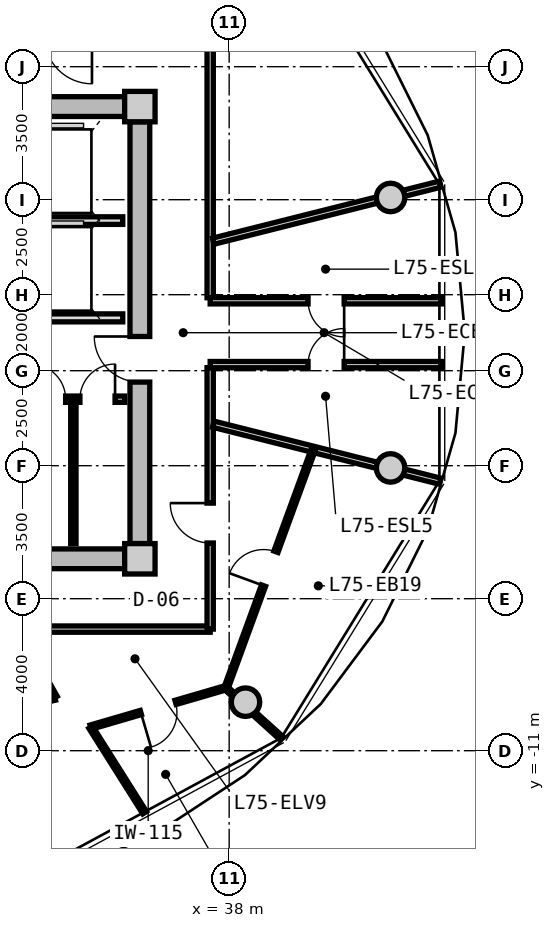
"""IFC4 building model, lengths in metres.
Left out: names, types, materials, properties, quantities, classifications, styles, units other than length and angle.
Written with IfcOpenShell. Run it as: python <this file> out.ifc"""

import sys

from ifc_helpers import new_model, si_unit, direction, frame, frame_2d, origin, origin_2d, place, context, subcontext, project, spatial, rectangle, circle, extrude, source, transform, mapped, element, fill, save


model = new_model("IFC4")
c1 = context("Model", 3, precision=1e-05, world=origin(), true_north=direction((0.0, 1.0)))
c2 = subcontext(c1, "Body", "Model", "MODEL_VIEW")
j1 = project(units=[si_unit("LENGTHUNIT", "METRE"), si_unit("PLANEANGLEUNIT", "RADIAN")], contexts=[c1])
p1 = place(None, origin())
s1 = spatial("IfcSite", under=j1, at=p1, CompositionType="ELEMENT")
p2 = place(p1, origin())
s2 = spatial("IfcBuilding", under=s1, at=p2, CompositionType="ELEMENT")
p3 = place(p2, frame((0.0, 0.0, 241.35)))
s3 = spatial("IfcBuildingStorey", under=s2, at=p3, CompositionType="ELEMENT", Elevation=241.35)
m1 = source(origin(), c2, "Body", "SweptSolid", [
    extrude(rectangle(XDim=0.8, YDim=0.8, at=origin_2d()), origin(), (0.0, 0.0, 1.0), 3.05),
])
for number, where, z_axis, x_axis in (
    (1, (35.65, -5.95, 0.0), (0.0, 0.0, 1.0), (1.0, 0.0, 0.0)),
    (2, (35.65, 5.95, 0.0), (0.0, 0.0, 1.0), (1.0, 0.0, 0.0)),
):
    element("IfcColumn", number, at=place(p3, frame(where, z_axis=z_axis, x_axis=x_axis)), inside=s3, PredefinedType="COLUMN", context=c2, shape_type="MappedRepresentation", body=[
        mapped(m1, transform((0.0, 0.0, 0.0), x_axis=(1.0, 0.0, 0.0), y_axis=(0.0, 1.0, 0.0), z_axis=(0.0, 0.0, 1.0), scale=1.0)),
    ])
m2 = source(origin(), c2, "Body", "SweptSolid", [
    extrude(rectangle(XDim=14.5, YDim=0.52, at=frame_2d((7.25, 0.0))), origin(), (0.0, 0.0, 1.0), 2.73),
])
for number, where, z_axis, x_axis in (
    (3, (20.75, 5.95, 0.0), (0.0, 0.0, 1.0), (1.0, 0.0, 0.0)),
    (4, (35.25, -5.95, 0.0), (0.0, 0.0, 1.0), (-1.0, 0.0, 0.0)),
):
    element("IfcWall", number, at=place(p3, frame(where, z_axis=z_axis, x_axis=x_axis)), inside=s3, PredefinedType="SHEAR", context=c2, shape_type="MappedRepresentation", body=[
        mapped(m2, transform((0.0, 0.0, 0.0), x_axis=(1.0, 0.0, 0.0), y_axis=(0.0, 1.0, 0.0), z_axis=(0.0, 0.0, 1.0), scale=1.0)),
    ])
m3 = source(origin(), c2, "Body", "SweptSolid", [
    extrude(rectangle(XDim=11.1, YDim=0.52, at=frame_2d((5.55, 0.0))), origin(), (0.0, 0.0, 1.0), 2.73),
])
p4 = place(p3, frame((35.65, 5.55, 0.0), z_axis=(0.0, 0.0, 1.0), x_axis=(0.0, -1.0, 0.0)))
e5 = element("IfcWall", 5, at=p4, inside=s3, PredefinedType="SHEAR", context=c2, shape_type="MappedRepresentation", body=[
    mapped(m3, transform((0.0, 0.0, 0.0), x_axis=(1.0, 0.0, 0.0), y_axis=(0.0, 1.0, 0.0), z_axis=(0.0, 0.0, 1.0), scale=1.0)),
])
p5 = place(p4, frame((5.65, 0.0, 0.0)))
e6 = element("IfcOpeningElement", 6, at=p5, cuts=e5, PredefinedType="OPENING", context=c2, shape_type="SweptSolid", body=[
    extrude(rectangle(XDim=1.2, YDim=2.15, at=frame_2d((0.6, 1.075))), frame((0.0, 0.27, 0.0), z_axis=(0.0, -1.0, 0.0), x_axis=(1.0, 0.0, 0.0)), (0.0, 0.0, 1.0), 0.54),
])
m4 = source(origin(), c2, "Body", "SweptSolid", [
    extrude(circle(Radius=0.375, at=origin_2d()), origin(), (0.0, 0.0, 1.0), 3.05),
])
for number, where, z_axis, x_axis in (
    (7, (42.247, 3.559, 0.0), (0.0, 0.0, 1.0), (1.0, 0.0, 0.0)),
    (8, (38.43, -9.723, 0.0), (0.0, 0.0, 1.0), (1.0, 0.0, 0.0)),
    (9, (42.247, -3.559, 0.0), (0.0, 0.0, 1.0), (1.0, 0.0, 0.0)),
):
    element("IfcColumn", number, at=place(p3, frame(where, z_axis=z_axis, x_axis=x_axis)), inside=s3, PredefinedType="COLUMN", context=c2, shape_type="MappedRepresentation", body=[
        mapped(m4, transform((0.0, 0.0, 0.0), x_axis=(1.0, 0.0, 0.0), y_axis=(0.0, 1.0, 0.0), z_axis=(0.0, 0.0, 1.0), scale=1.0)),
    ])
m5 = source(origin(), c2, "Body", "SweptSolid", [
    extrude(rectangle(XDim=3.2, YDim=0.2, at=frame_2d((1.6, 0.0))), origin(), (0.0, 0.0, 1.0), 2.715),
])
p6 = place(p3, frame((32.0, 2.95, 0.0), z_axis=(0.0, 0.0, 1.0), x_axis=(1.0, 0.0, 0.0)))
e10 = element("IfcWall", 10, at=p6, inside=s3, PredefinedType="PARTITIONING", context=c2, shape_type="MappedRepresentation", body=[
    mapped(m5, transform((0.0, 0.0, 0.0), x_axis=(1.0, 0.0, 0.0), y_axis=(0.0, 1.0, 0.0), z_axis=(0.0, 0.0, 1.0), scale=1.0)),
])
m6 = source(origin(), c2, "Body", "SweptSolid", [
    extrude(rectangle(XDim=6.66, YDim=0.21, at=frame_2d((3.33, 0.0))), origin(), (0.0, 0.0, 1.0), 2.715),
])
p7 = place(p3, frame((28.54, 0.39, 0.0), z_axis=(0.0, 0.0, 1.0), x_axis=(1.0, 0.0, 0.0)))
e11 = element("IfcWall", 11, at=p7, inside=s3, PredefinedType="PARTITIONING", context=c2, shape_type="MappedRepresentation", body=[
    mapped(m6, transform((0.0, 0.0, 0.0), x_axis=(1.0, 0.0, 0.0), y_axis=(0.0, 1.0, 0.0), z_axis=(0.0, 0.0, 1.0), scale=1.0)),
])
p8 = place(p7, frame((1.0, 0.0, 0.0)))
e12 = element("IfcOpeningElement", 12, at=p8, cuts=e11, PredefinedType="OPENING", context=c2, shape_type="SweptSolid", body=[
    extrude(rectangle(XDim=1.2, YDim=2.15, at=frame_2d((0.6, 1.075))), frame((0.0, 0.115, 0.0), z_axis=(0.0, -1.0, 0.0), x_axis=(1.0, 0.0, 0.0)), (0.0, 0.0, 1.0), 0.23),
])
m7 = source(origin(), c2, "Body", "SweptSolid", [
    extrude(rectangle(XDim=2.7, YDim=0.165, at=frame_2d((1.35, 0.0))), origin(), (0.0, 0.0, 1.0), 2.715),
])
p9 = place(p3, frame((32.55, -1.75, 0.0), z_axis=(0.0, 0.0, 1.0), x_axis=(1.0, 0.0, 0.0)))
e13 = element("IfcWall", 13, at=p9, inside=s3, PredefinedType="PARTITIONING", context=c2, shape_type="MappedRepresentation", body=[
    mapped(m7, transform((0.0, 0.0, 0.0), x_axis=(1.0, 0.0, 0.0), y_axis=(0.0, 1.0, 0.0), z_axis=(0.0, 0.0, 1.0), scale=1.0)),
])
p10 = place(p9, frame((0.222, 0.0, 0.0)))
e14 = element("IfcOpeningElement", 14, at=p10, cuts=e13, PredefinedType="OPENING", context=c2, shape_type="SweptSolid", body=[
    extrude(rectangle(XDim=0.925, YDim=2.1, at=frame_2d((0.462, 1.05))), frame((0.0, 0.093, 0.0), z_axis=(0.0, -1.0, 0.0), x_axis=(1.0, 0.0, 0.0)), (0.0, 0.0, 1.0), 0.185),
])
p11 = place(p9, frame((1.522, 0.0, 0.0)))
e15 = element("IfcOpeningElement", 15, at=p11, cuts=e13, PredefinedType="OPENING", context=c2, shape_type="SweptSolid", body=[
    extrude(rectangle(XDim=0.925, YDim=2.1, at=frame_2d((0.462, 1.05))), frame((0.0, 0.093, 0.0), z_axis=(0.0, -1.0, 0.0), x_axis=(1.0, 0.0, 0.0)), (0.0, 0.0, 1.0), 0.185),
])
m8 = source(origin(), c2, "Body", "SweptSolid", [
    extrude(rectangle(XDim=3.8, YDim=0.14, at=frame_2d((1.9, 0.0))), origin(), (0.0, 0.0, 1.0), 2.715),
])
p12 = place(p3, frame((33.9, -5.55, 0.0), z_axis=(0.0, 0.0, 1.0), x_axis=(0.0, 1.0, 0.0)))
e16 = element("IfcWall", 16, at=p12, inside=s3, PredefinedType="PARTITIONING", context=c2, shape_type="MappedRepresentation", body=[
    mapped(m8, transform((0.0, 0.0, 0.0), x_axis=(1.0, 0.0, 0.0), y_axis=(0.0, 1.0, 0.0), z_axis=(0.0, 0.0, 1.0), scale=1.0)),
])
m9 = source(origin(), c2, "Body", "SweptSolid", [
    extrude(rectangle(XDim=19.0, YDim=0.165, at=frame_2d((9.5, 0.0))), origin(), (0.0, 0.0, 1.0), 2.715),
])
p13 = place(p3, frame((37.5, -7.8, 0.0), z_axis=(0.0, 0.0, 1.0), x_axis=(-1.0, 0.0, 0.0)))
e17 = element("IfcWall", 17, at=p13, inside=s3, PredefinedType="PARTITIONING", context=c2, shape_type="MappedRepresentation", body=[
    mapped(m9, transform((0.0, 0.0, 0.0), x_axis=(1.0, 0.0, 0.0), y_axis=(0.0, 1.0, 0.0), z_axis=(0.0, 0.0, 1.0), scale=1.0)),
])
p14 = place(p13, frame((12.373, 0.0, 0.0)))
e18 = element("IfcOpeningElement", 18, at=p14, cuts=e17, PredefinedType="OPENING", context=c2, shape_type="SweptSolid", body=[
    extrude(rectangle(XDim=1.25, YDim=2.2, at=frame_2d((0.625, 1.1))), frame((0.0, 0.093, 0.0), z_axis=(0.0, -1.0, 0.0), x_axis=(1.0, 0.0, 0.0)), (0.0, 0.0, 1.0), 0.185),
])
m10 = source(origin(), c2, "Body", "SweptSolid", [
    extrude(rectangle(XDim=6.88, YDim=0.165, at=frame_2d((3.44, 0.0))), origin(), (0.0, 0.0, 1.0), 2.715),
])
p15 = place(p3, frame((37.5, 7.8, 0.0), z_axis=(0.0, 0.0, 1.0), x_axis=(0.0, -1.0, 0.0)))
e19 = element("IfcWall", 19, at=p15, inside=s3, PredefinedType="PARTITIONING", context=c2, shape_type="MappedRepresentation", body=[
    mapped(m10, transform((0.0, 0.0, 0.0), x_axis=(1.0, 0.0, 0.0), y_axis=(0.0, 1.0, 0.0), z_axis=(0.0, 0.0, 1.0), scale=1.0)),
])
p16 = place(p3, frame((37.5, -0.92, 0.0), z_axis=(0.0, 0.0, 1.0), x_axis=(0.0, -1.0, 0.0)))
e20 = element("IfcWall", 20, at=p16, inside=s3, PredefinedType="PARTITIONING", context=c2, shape_type="MappedRepresentation", body=[
    mapped(m10, transform((0.0, 0.0, 0.0), x_axis=(1.0, 0.0, 0.0), y_axis=(0.0, 1.0, 0.0), z_axis=(0.0, 0.0, 1.0), scale=1.0)),
])
p17 = place(p16, frame((3.564, 0.0, 0.0)))
e21 = element("IfcOpeningElement", 21, at=p17, cuts=e20, PredefinedType="OPENING", context=c2, shape_type="SweptSolid", body=[
    extrude(rectangle(XDim=1.05, YDim=2.15, at=frame_2d((0.525, 1.075))), frame((0.0, 0.093, 0.0), z_axis=(0.0, -1.0, 0.0), x_axis=(1.0, 0.0, 0.0)), (0.0, 0.0, 1.0), 0.185),
])
m11 = source(origin(), c2, "Body", "SweptSolid", [
    extrude(rectangle(XDim=6.157, YDim=0.165, at=frame_2d((3.079, 0.0))), origin(), (0.0, 0.0, 1.0), 2.315),
])
for number, where, z_axis, x_axis in (
    (22, (37.58, -2.407, 0.0), (0.0, 0.0, 1.0), (0.97, -0.244, 0.0)),
    (23, (37.58, 2.407, 0.0), (0.0, 0.0, 1.0), (0.97, 0.244, 0.0)),
):
    element("IfcWall", number, at=place(p3, frame(where, z_axis=z_axis, x_axis=x_axis)), inside=s3, PredefinedType="PARTITIONING", context=c2, shape_type="MappedRepresentation", body=[
        mapped(m11, transform((0.0, 0.0, 0.0), x_axis=(1.0, 0.0, 0.0), y_axis=(0.0, 1.0, 0.0), z_axis=(0.0, 0.0, 1.0), scale=1.0)),
    ])
m12 = source(origin(), c2, "Body", "SweptSolid", [
    extrude(rectangle(XDim=6.101, YDim=0.165, at=frame_2d((3.051, 0.0))), origin(), (0.0, 0.0, 1.0), 2.715),
])
p18 = place(p3, frame((37.5, 0.84, 0.0), z_axis=(0.0, 0.0, 1.0), x_axis=(1.0, 0.0, 0.0)))
e24 = element("IfcWall", 24, at=p18, inside=s3, PredefinedType="PARTITIONING", context=c2, shape_type="MappedRepresentation", body=[
    mapped(m12, transform((0.0, 0.0, 0.0), x_axis=(1.0, 0.0, 0.0), y_axis=(0.0, 1.0, 0.0), z_axis=(0.0, 0.0, 1.0), scale=1.0)),
])
p19 = place(p18, frame((2.576, 0.0, 0.0)))
e25 = element("IfcOpeningElement", 25, at=p19, cuts=e24, PredefinedType="OPENING", context=c2, shape_type="SweptSolid", body=[
    extrude(rectangle(XDim=0.95, YDim=2.1, at=frame_2d((0.475, 1.05))), frame((0.0, 0.093, 0.0), z_axis=(0.0, -1.0, 0.0), x_axis=(1.0, 0.0, 0.0)), (0.0, 0.0, 1.0), 0.185),
])
p20 = place(p3, frame((43.601, -0.84, 0.0), z_axis=(0.0, 0.0, 1.0), x_axis=(-1.0, 0.0, 0.0)))
e26 = element("IfcWall", 26, at=p20, inside=s3, PredefinedType="PARTITIONING", context=c2, shape_type="MappedRepresentation", body=[
    mapped(m12, transform((0.0, 0.0, 0.0), x_axis=(1.0, 0.0, 0.0), y_axis=(0.0, 1.0, 0.0), z_axis=(0.0, 0.0, 1.0), scale=1.0)),
])
p21 = place(p20, frame((2.576, 0.0, 0.0)))
e27 = element("IfcOpeningElement", 27, at=p21, cuts=e26, PredefinedType="OPENING", context=c2, shape_type="SweptSolid", body=[
    extrude(rectangle(XDim=0.95, YDim=2.1, at=frame_2d((0.475, 1.05))), frame((0.0, 0.093, 0.0), z_axis=(0.0, -1.0, 0.0), x_axis=(1.0, 0.0, 0.0)), (0.0, 0.0, 1.0), 0.185),
])
m13 = source(origin(), c2, "Body", "SweptSolid", [
    extrude(rectangle(XDim=6.69, YDim=0.115, at=frame_2d((3.345, 0.0))), origin(), (0.0, 0.0, 1.0), 2.715),
])
p22 = place(p3, frame((37.917, -9.352, 0.0), z_axis=(0.0, 0.0, 1.0), x_axis=(0.343693784919, 0.939081776102, 0.0)))
e28 = element("IfcWall", 28, at=p22, inside=s3, PredefinedType="PARTITIONING", context=c2, shape_type="MappedRepresentation", body=[
    mapped(m13, transform((0.0, 0.0, 0.0), x_axis=(1.0, 0.0, 0.0), y_axis=(0.0, 1.0, 0.0), z_axis=(0.0, 0.0, 1.0), scale=1.0)),
])
p23 = place(p22, frame((2.87, 0.0, 0.0)))
e29 = element("IfcOpeningElement", 29, at=p23, cuts=e28, PredefinedType="OPENING", context=c2, shape_type="SweptSolid", body=[
    extrude(rectangle(XDim=0.95, YDim=2.1, at=frame_2d((0.475, 1.05))), frame((0.0, 0.067, 0.0), z_axis=(0.0, -1.0, 0.0), x_axis=(1.0, 0.0, 0.0)), (0.0, 0.0, 1.0), 0.135),
])
m14 = source(origin(), c2, "Body", "SweptSolid", [
    extrude(rectangle(XDim=1.977, YDim=0.115, at=frame_2d((0.989, 0.0))), origin(), (0.0, 0.0, 1.0), 2.315),
])
p24 = place(p3, frame((37.917, -9.352, 0.0), z_axis=(0.0, 0.0, 1.0), x_axis=(0.742064998629, -0.670327933037, 0.0)))
e30 = element("IfcWall", 30, at=p24, inside=s3, PredefinedType="PARTITIONING", context=c2, shape_type="MappedRepresentation", body=[
    mapped(m14, transform((0.0, 0.0, 0.0), x_axis=(1.0, 0.0, 0.0), y_axis=(0.0, 1.0, 0.0), z_axis=(0.0, 0.0, 1.0), scale=1.0)),
])
m15 = source(origin(), c2, "Body", "SweptSolid", [
    extrude(rectangle(XDim=2.035, YDim=0.14, at=frame_2d((1.018, 0.0))), origin(), (0.0, 0.0, 1.0), 2.715),
])
p25 = place(p3, frame((32.415, -7.83, 0.0), z_axis=(0.0, 0.0, 1.0), x_axis=(0.491092509169, -0.871107425888, 0.0)))
e31 = element("IfcWall", 31, at=p25, inside=s3, PredefinedType="PARTITIONING", context=c2, shape_type="MappedRepresentation", body=[
    mapped(m15, transform((0.0, 0.0, 0.0), x_axis=(1.0, 0.0, 0.0), y_axis=(0.0, 1.0, 0.0), z_axis=(0.0, 0.0, 1.0), scale=1.0)),
])
m16 = source(origin(), c2, "Body", "SweptSolid", [
    extrude(rectangle(XDim=2.586, YDim=0.14, at=frame_2d((1.293, 0.0))), origin(), (0.0, 0.0, 1.0), 2.715),
])
p26 = place(p3, frame((33.415, -9.603, 0.0), z_axis=(0.0, 0.0, 1.0), x_axis=(-0.973691298219, -0.227871138526, 0.0)))
e32 = element("IfcWall", 32, at=p26, inside=s3, PredefinedType="PARTITIONING", context=c2, shape_type="MappedRepresentation", body=[
    mapped(m16, transform((0.0, 0.0, 0.0), x_axis=(1.0, 0.0, 0.0), y_axis=(0.0, 1.0, 0.0), z_axis=(0.0, 0.0, 1.0), scale=1.0)),
])
p27 = place(p26, frame((0.833, 0.0, 0.0)))
e33 = element("IfcOpeningElement", 33, at=p27, cuts=e32, PredefinedType="OPENING", context=c2, shape_type="SweptSolid", body=[
    extrude(rectangle(XDim=0.92, YDim=2.1, at=frame_2d((0.46, 1.05))), frame((0.0, 0.08, 0.0), z_axis=(0.0, -1.0, 0.0), x_axis=(1.0, 0.0, 0.0)), (0.0, 0.0, 1.0), 0.16),
])
m17 = source(origin(), c2, "Body", "SweptSolid", [
    extrude(rectangle(XDim=2.662, YDim=0.115, at=frame_2d((1.331, 0.0))), origin(), (0.0, 0.0, 1.0), 2.715),
])
p28 = place(p3, frame((34.355, -10.38, 0.0), z_axis=(0.0, 0.0, 1.0), x_axis=(0.533547747092, -0.845769946009, 0.0)))
e34 = element("IfcWall", 34, at=p28, inside=s3, PredefinedType="PARTITIONING", context=c2, shape_type="MappedRepresentation", body=[
    mapped(m17, transform((0.0, 0.0, 0.0), x_axis=(1.0, 0.0, 0.0), y_axis=(0.0, 1.0, 0.0), z_axis=(0.0, 0.0, 1.0), scale=1.0)),
])
m18 = source(origin(), c2, "Body", "SweptSolid", [
    extrude(rectangle(XDim=3.702, YDim=0.115, at=frame_2d((1.851, 0.0))), origin(), (0.0, 0.0, 1.0), 2.715),
])
p29 = place(p3, frame((34.355, -10.38, 0.0), z_axis=(0.0, 0.0, 1.0), x_axis=(0.960044309887, 0.279848035645, 0.0)))
e35 = element("IfcWall", 35, at=p29, inside=s3, PredefinedType="PARTITIONING", context=c2, shape_type="MappedRepresentation", body=[
    mapped(m18, transform((0.0, 0.0, 0.0), x_axis=(1.0, 0.0, 0.0), y_axis=(0.0, 1.0, 0.0), z_axis=(0.0, 0.0, 1.0), scale=1.0)),
])
p30 = place(p29, frame((1.376, 0.0, 0.0)))
e36 = element("IfcOpeningElement", 36, at=p30, cuts=e35, PredefinedType="OPENING", context=c2, shape_type="SweptSolid", body=[
    extrude(rectangle(XDim=0.95, YDim=2.1, at=frame_2d((0.475, 1.05))), frame((0.0, 0.067, 0.0), z_axis=(0.0, -1.0, 0.0), x_axis=(1.0, 0.0, 0.0)), (0.0, 0.0, 1.0), 0.135),
])
m19 = source(origin(), c2, "Body", "SweptSolid", [
    extrude(rectangle(XDim=1.2, YDim=2.15, at=frame_2d((0.6, 1.075))), frame((0.0, 0.025, 0.0), z_axis=(0.0, -1.0, 0.0), x_axis=(1.0, 0.0, 0.0)), (0.0, 0.0, 1.0), 0.05),
])
p31 = place(p5, frame((1.2, 0.0, 0.0), z_axis=(0.0, 0.0, 1.0), x_axis=(-1.0, 0.0, 0.0)))
e37 = element("IfcDoor", 37, at=p31, inside=s3, OperationType="SINGLE_SWING_RIGHT", PredefinedType="DOOR", context=c2, shape_type="MappedRepresentation", body=[
    mapped(m19, transform((0.0, 0.0, 0.0), x_axis=(1.0, 0.0, 0.0), y_axis=(0.0, 1.0, 0.0), z_axis=(0.0, 0.0, 1.0), scale=1.0)),
])
fill(e6, e37)
m20 = source(origin(), c2, "Body", "SweptSolid", [
    extrude(rectangle(XDim=0.925, YDim=2.1, at=frame_2d((0.462, 1.05))), frame((0.0, 0.025, 0.0), z_axis=(0.0, -1.0, 0.0), x_axis=(1.0, 0.0, 0.0)), (0.0, 0.0, 1.0), 0.05),
])
p32 = place(p10, origin())
e38 = element("IfcDoor", 38, at=p32, inside=s3, OperationType="SINGLE_SWING_LEFT", PredefinedType="DOOR", context=c2, shape_type="MappedRepresentation", body=[
    mapped(m20, transform((0.0, 0.0, 0.0), x_axis=(1.0, 0.0, 0.0), y_axis=(0.0, 1.0, 0.0), z_axis=(0.0, 0.0, 1.0), scale=1.0)),
])
fill(e14, e38)
p33 = place(p11, origin())
e39 = element("IfcDoor", 39, at=p33, inside=s3, OperationType="SINGLE_SWING_RIGHT", PredefinedType="DOOR", context=c2, shape_type="MappedRepresentation", body=[
    mapped(m20, transform((0.0, 0.0, 0.0), x_axis=(1.0, 0.0, 0.0), y_axis=(0.0, 1.0, 0.0), z_axis=(0.0, 0.0, 1.0), scale=1.0)),
])
fill(e15, e39)
m21 = source(origin(), c2, "Body", "SweptSolid", [
    extrude(rectangle(XDim=0.95, YDim=2.1, at=frame_2d((0.475, 1.05))), frame((0.0, 0.025, 0.0), z_axis=(0.0, -1.0, 0.0), x_axis=(1.0, 0.0, 0.0)), (0.0, 0.0, 1.0), 0.05),
])
p34 = place(p21, frame((0.95, 0.0, 0.0), z_axis=(0.0, 0.0, 1.0), x_axis=(-1.0, 0.0, 0.0)))
e40 = element("IfcDoor", 40, at=p34, inside=s3, OperationType="SINGLE_SWING_RIGHT", PredefinedType="DOOR", context=c2, shape_type="MappedRepresentation", body=[
    mapped(m21, transform((0.0, 0.0, 0.0), x_axis=(1.0, 0.0, 0.0), y_axis=(0.0, 1.0, 0.0), z_axis=(0.0, 0.0, 1.0), scale=1.0)),
])
fill(e27, e40)
p35 = place(p19, frame((0.95, 0.0, 0.0), z_axis=(0.0, 0.0, 1.0), x_axis=(-1.0, 0.0, 0.0)))
e41 = element("IfcDoor", 41, at=p35, inside=s3, OperationType="SINGLE_SWING_LEFT", PredefinedType="DOOR", context=c2, shape_type="MappedRepresentation", body=[
    mapped(m21, transform((0.0, 0.0, 0.0), x_axis=(1.0, 0.0, 0.0), y_axis=(0.0, 1.0, 0.0), z_axis=(0.0, 0.0, 1.0), scale=1.0)),
])
fill(e25, e41)
m22 = source(origin(), c2, "Body", "SweptSolid", [
    extrude(rectangle(XDim=1.05, YDim=2.15, at=frame_2d((0.525, 1.075))), frame((0.0, 0.025, 0.0), z_axis=(0.0, -1.0, 0.0), x_axis=(1.0, 0.0, 0.0)), (0.0, 0.0, 1.0), 0.05),
])
p36 = place(p17, frame((1.05, 0.0, 0.0), z_axis=(0.0, 0.0, 1.0), x_axis=(-1.0, 0.0, 0.0)))
e42 = element("IfcDoor", 42, at=p36, inside=s3, OperationType="SINGLE_SWING_RIGHT", PredefinedType="DOOR", context=c2, shape_type="MappedRepresentation", body=[
    mapped(m22, transform((0.0, 0.0, 0.0), x_axis=(1.0, 0.0, 0.0), y_axis=(0.0, 1.0, 0.0), z_axis=(0.0, 0.0, 1.0), scale=1.0)),
])
fill(e21, e42)
p37 = place(p30, frame((0.95, 0.0, 0.0), z_axis=(0.0, 0.0, 1.0), x_axis=(-1.0, 0.0, 0.0)))
e43 = element("IfcDoor", 43, at=p37, inside=s3, OperationType="SINGLE_SWING_RIGHT", PredefinedType="DOOR", context=c2, shape_type="MappedRepresentation", body=[
    mapped(m21, transform((0.0, 0.0, 0.0), x_axis=(1.0, 0.0, 0.0), y_axis=(0.0, 1.0, 0.0), z_axis=(0.0, 0.0, 1.0), scale=1.0)),
])
fill(e36, e43)
p38 = place(p23, origin())
e44 = element("IfcDoor", 44, at=p38, inside=s3, OperationType="SINGLE_SWING_LEFT", PredefinedType="DOOR", context=c2, shape_type="MappedRepresentation", body=[
    mapped(m21, transform((0.0, 0.0, 0.0), x_axis=(1.0, 0.0, 0.0), y_axis=(0.0, 1.0, 0.0), z_axis=(0.0, 0.0, 1.0), scale=1.0)),
])
fill(e29, e44)
save(model, sys.argv[1])
